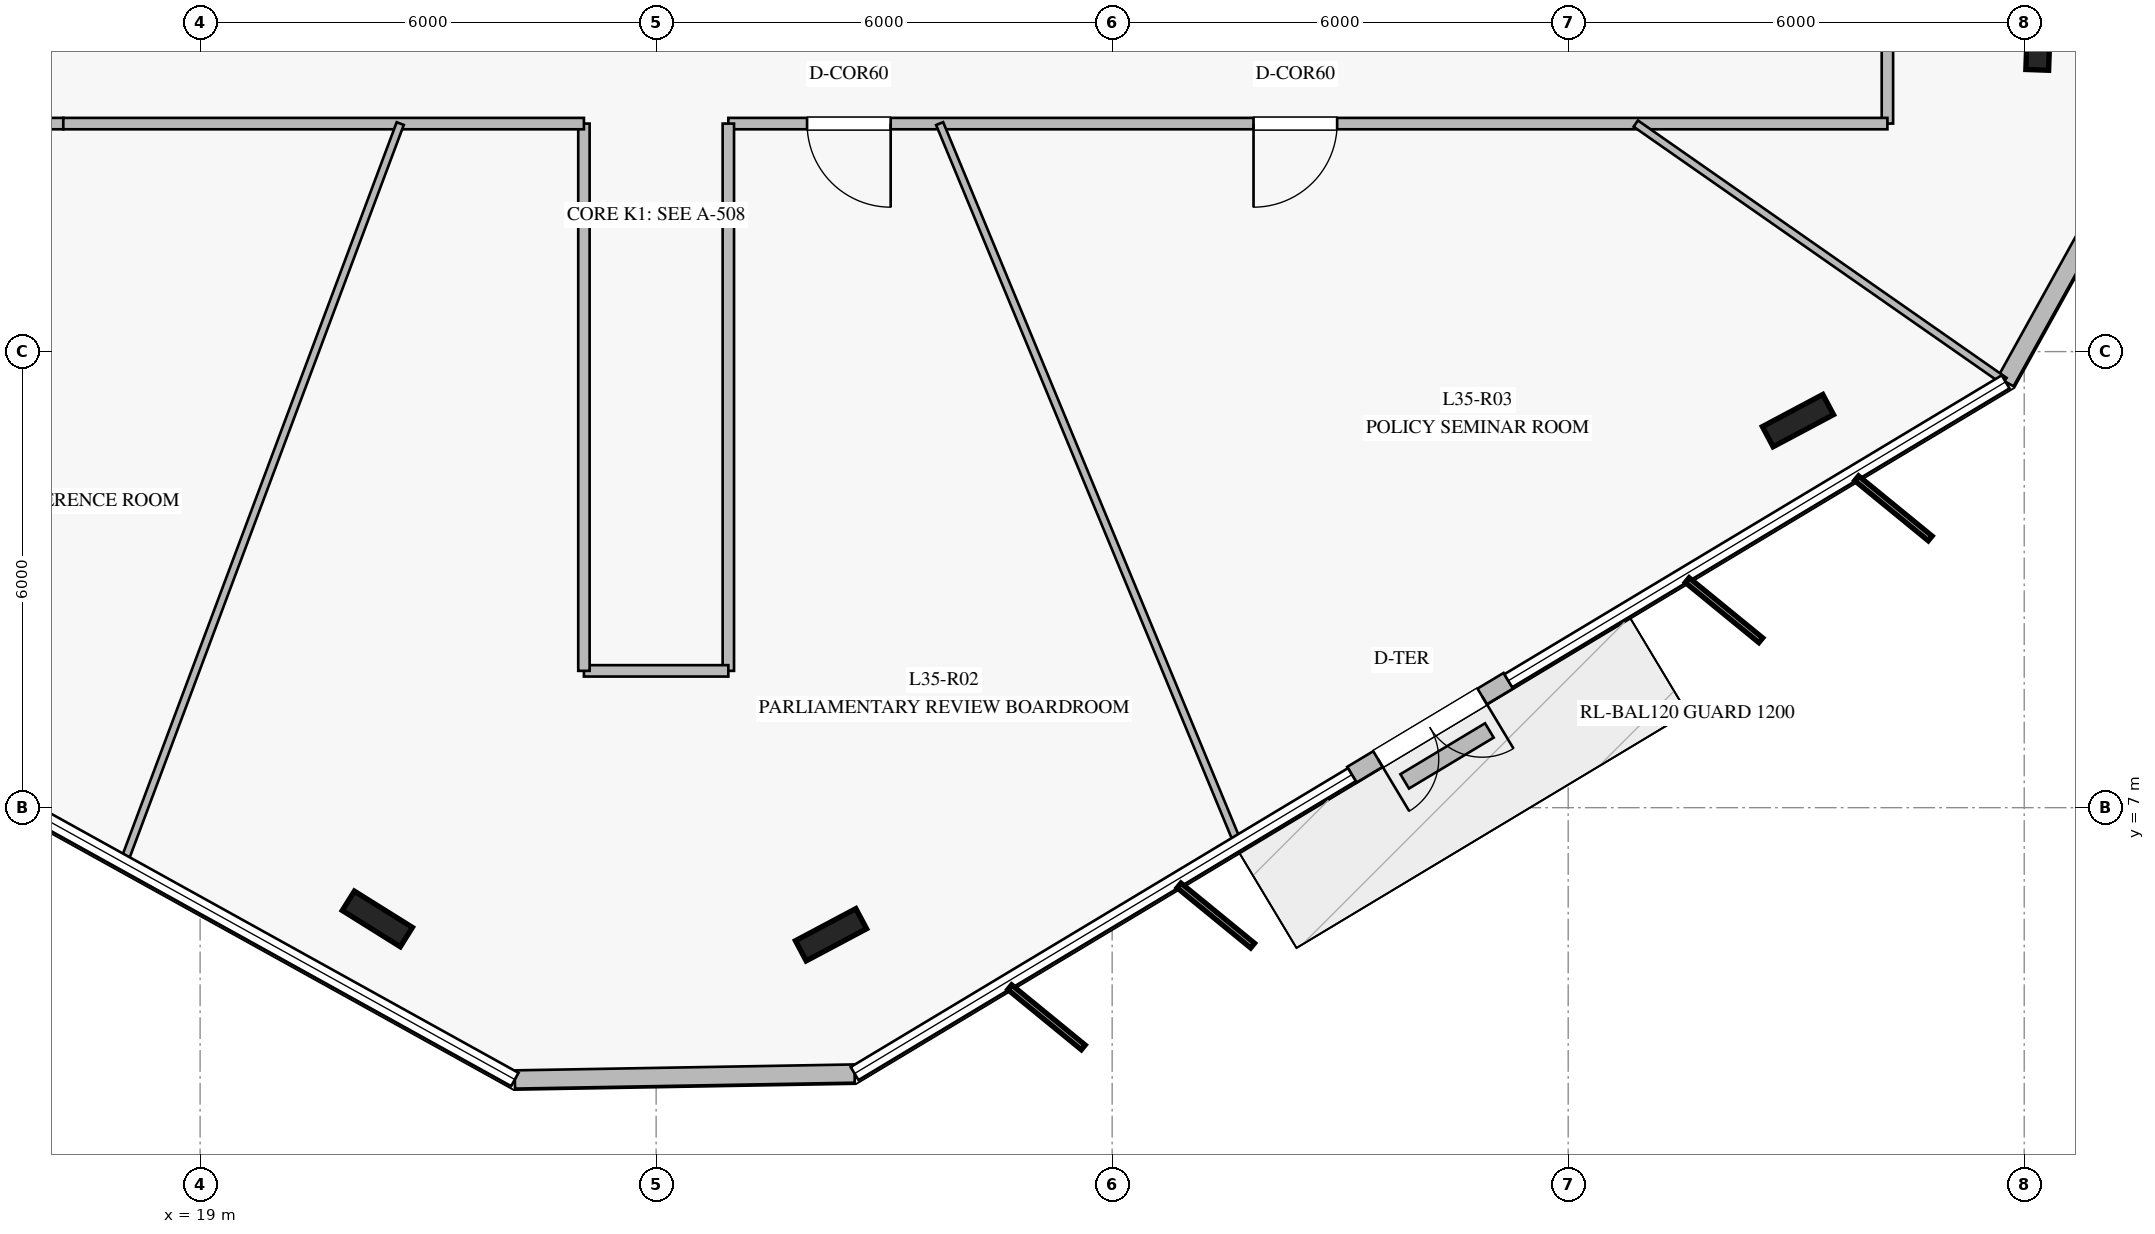
"""IFC4 building model, lengths in metres.
Left out: names, types, materials, properties, quantities, classifications, styles, units other than length and angle.
Written with IfcOpenShell. Run it as: python <this file> out.ifc"""

import sys

from ifc_helpers import new_model, si_unit, direction, frame, frame_2d, origin, origin_2d, place, context, subcontext, project, spatial, rectangle, i_section, extrude, element, fill, save


model = new_model("IFC4")
c1 = context("Model", 3, precision=1e-05, world=origin(), true_north=direction((0.0, 1.0)))
c2 = subcontext(c1, "Body", "Model", "MODEL_VIEW")
j1 = project(units=[si_unit("LENGTHUNIT", "METRE"), si_unit("PLANEANGLEUNIT", "RADIAN")], contexts=[c1])
p1 = place(None, origin())
s1 = spatial("IfcSite", under=j1, at=p1, CompositionType="ELEMENT")
p2 = place(p1, origin())
s2 = spatial("IfcBuilding", under=s1, at=p2, CompositionType="ELEMENT")
p3 = place(p2, frame((0.0, 0.0, 146.4)))
s3 = spatial("IfcBuildingStorey", under=s2, at=p3, CompositionType="ELEMENT", Elevation=146.4)
for number, where, z_axis, x_axis in (
    (1, (21.332, 5.536, 0.0), (0.0, 0.0, 1.0), (-0.848, 0.53, 0.0)),
    (2, (27.301, 5.328, 0.0), (0.0, 0.0, 1.0), (0.883, 0.469, 0.0)),
    (3, (40.023, 12.092, 0.0), (0.0, 0.0, 1.0), (0.883, 0.469, 0.0)),
):
    element("IfcColumn", number, at=place(p3, frame(where, z_axis=z_axis, x_axis=x_axis)), inside=s3, PredefinedType="COLUMN", context=c2, shape_type="SweptSolid", body=[
        extrude(i_section(OverallWidth=0.3, OverallDepth=0.9, WebThickness=0.019, FlangeThickness=0.035, at=origin_2d()), origin(), (0.0, 0.0, 1.0), 4.0),
    ])
p4 = place(p3, frame((23.141, 3.424, 0.0), z_axis=(0.0, 0.0, 1.0), x_axis=(0.999848251902, 0.017420481313, 0.0)))
e4 = element("IfcWall", 4, at=p4, inside=s3, PredefinedType="STANDARD", context=c2, shape_type="SweptSolid", body=[
    extrude(rectangle(XDim=4.471, YDim=0.24, at=frame_2d((2.235, 0.0))), origin(), (0.0, 0.0, 1.0), 3.76),
])
p5 = place(p3, frame((34.154, 7.434, 0.0), z_axis=(0.0, 0.0, 1.0), x_axis=(0.857286451771, 0.514839722253, 0.0)))
e5 = element("IfcWall", 5, at=p5, inside=s3, PredefinedType="STANDARD", context=c2, shape_type="SweptSolid", body=[
    extrude(rectangle(XDim=2.4, YDim=0.24, at=frame_2d((1.2, 0.0))), origin(), (0.0, 0.0, 1.0), 3.76),
])
p6 = place(p5, frame((0.4, 0.0, 0.0)))
e6 = element("IfcOpeningElement", 6, at=p6, cuts=e5, PredefinedType="OPENING", context=c2, shape_type="SweptSolid", body=[
    extrude(rectangle(XDim=1.6, YDim=2.25, at=frame_2d((0.8, 1.125))), frame((0.0, 0.13, 0.0), z_axis=(0.0, -1.0, 0.0), x_axis=(1.0, 0.0, 0.0)), (0.0, 0.0, 1.0), 0.26),
])
p7 = place(p3, frame((42.755, 12.602, 0.0), z_axis=(0.0, 0.0, 1.0), x_axis=(0.484965863304, 0.874533081953, 0.0)))
e7 = element("IfcWall", 7, at=p7, inside=s3, PredefinedType="STANDARD", context=c2, shape_type="SweptSolid", body=[
    extrude(rectangle(XDim=4.471, YDim=0.24, at=frame_2d((2.235, 0.0))), origin(), (0.0, 0.0, 1.0), 3.76),
])
p8 = place(p3, frame((34.849, 7.346, 0.0), z_axis=(0.0, 0.0, 1.0), x_axis=(0.856845918969, 0.515572566324, 0.0)))
e8 = element("IfcWall", 8, at=p8, inside=s3, PredefinedType="USERDEFINED", context=c2, shape_type="SweptSolid", body=[
    extrude(rectangle(XDim=1.3, YDim=0.22, at=frame_2d((0.65, 0.0))), origin(), (0.0, 0.0, 1.0), 0.4),
])
p9 = place(p3, frame((17.2, 16.0, 0.0), z_axis=(0.0, 0.0, 1.0), x_axis=(-1.0, 0.0, 0.0)))
e9 = element("IfcWall", 9, at=p9, inside=s3, PredefinedType="PARTITIONING", context=c2, shape_type="SweptSolid", body=[
    extrude(rectangle(XDim=1.8, YDim=0.15, at=frame_2d((0.9, 0.0))), origin(), (0.0, 0.0, 1.0), 3.36),
])
p10 = place(p9, frame((0.287, 0.0, 0.0)))
e10 = element("IfcOpeningElement", 10, at=p10, cuts=e9, PredefinedType="OPENING", context=c2, shape_type="SweptSolid", body=[
    extrude(rectangle(XDim=1.1, YDim=2.2, at=frame_2d((0.55, 1.1))), frame((0.0, 0.085, 0.0), z_axis=(0.0, -1.0, 0.0), x_axis=(1.0, 0.0, 0.0)), (0.0, 0.0, 1.0), 0.17),
])
p11 = place(p3, frame((41.2, 17.8, 0.0), z_axis=(0.0, 0.0, 1.0), x_axis=(0.0, -1.0, 0.0)))
e11 = element("IfcWall", 11, at=p11, inside=s3, PredefinedType="PARTITIONING", context=c2, shape_type="SweptSolid", body=[
    extrude(rectangle(XDim=1.8, YDim=0.15, at=frame_2d((0.9, 0.0))), origin(), (0.0, 0.0, 1.0), 3.21),
])
p12 = place(p3, frame((41.2, 16.0, 0.0), z_axis=(0.0, 0.0, 1.0), x_axis=(-1.0, 0.0, 0.0)))
e12 = element("IfcWall", 12, at=p12, inside=s3, PredefinedType="PARTITIONING", context=c2, shape_type="SweptSolid", body=[
    extrude(rectangle(XDim=15.25, YDim=0.15, at=frame_2d((7.625, 0.0))), origin(), (0.0, 0.0, 1.0), 3.21),
])
p13 = place(p12, frame((13.114, 0.0, 0.0)))
e13 = element("IfcOpeningElement", 13, at=p13, cuts=e12, PredefinedType="OPENING", context=c2, shape_type="SweptSolid", body=[
    extrude(rectangle(XDim=1.1, YDim=2.2, at=frame_2d((0.55, 1.1))), frame((0.0, 0.085, 0.0), z_axis=(0.0, -1.0, 0.0), x_axis=(1.0, 0.0, 0.0)), (0.0, 0.0, 1.0), 0.17),
])
p14 = place(p12, frame((7.24, 0.0, 0.0)))
e14 = element("IfcOpeningElement", 14, at=p14, cuts=e12, PredefinedType="OPENING", context=c2, shape_type="SweptSolid", body=[
    extrude(rectangle(XDim=1.1, YDim=2.2, at=frame_2d((0.55, 1.1))), frame((0.0, 0.085, 0.0), z_axis=(0.0, -1.0, 0.0), x_axis=(1.0, 0.0, 0.0)), (0.0, 0.0, 1.0), 0.17),
])
p15 = place(p3, frame((25.95, 16.0, 0.0), z_axis=(0.0, 0.0, 1.0), x_axis=(0.0, -1.0, 0.0)))
e15 = element("IfcWall", 15, at=p15, inside=s3, PredefinedType="PARTITIONING", context=c2, shape_type="SweptSolid", body=[
    extrude(rectangle(XDim=7.2, YDim=0.15, at=frame_2d((3.6, 0.0))), origin(), (0.0, 0.0, 1.0), 3.36),
])
p16 = place(p3, frame((25.95, 8.8, 0.0), z_axis=(0.0, 0.0, 1.0), x_axis=(-1.0, 0.0, 0.0)))
e16 = element("IfcWall", 16, at=p16, inside=s3, PredefinedType="PARTITIONING", context=c2, shape_type="SweptSolid", body=[
    extrude(rectangle(XDim=1.9, YDim=0.15, at=frame_2d((0.95, 0.0))), origin(), (0.0, 0.0, 1.0), 3.76),
])
p17 = place(p3, frame((24.05, 8.8, 0.0), z_axis=(0.0, 0.0, 1.0), x_axis=(0.0, 1.0, 0.0)))
e17 = element("IfcWall", 17, at=p17, inside=s3, PredefinedType="PARTITIONING", context=c2, shape_type="SweptSolid", body=[
    extrude(rectangle(XDim=7.2, YDim=0.15, at=frame_2d((3.6, 0.0))), origin(), (0.0, 0.0, 1.0), 3.36),
])
p18 = place(p3, frame((24.05, 16.0, 0.0), z_axis=(0.0, 0.0, 1.0), x_axis=(-1.0, 0.0, 0.0)))
e18 = element("IfcWall", 18, at=p18, inside=s3, PredefinedType="PARTITIONING", context=c2, shape_type="SweptSolid", body=[
    extrude(rectangle(XDim=6.85, YDim=0.15, at=frame_2d((3.425, 0.0))), origin(), (0.0, 0.0, 1.0), 3.21),
])
p19 = place(p3, frame((21.633, 16.0, 0.0), z_axis=(0.0, 0.0, 1.0), x_axis=(-0.350441839508, -0.936584495453, 0.0)))
e19 = element("IfcWall", 19, at=p19, inside=s3, PredefinedType="MOVABLE", context=c2, shape_type="SweptSolid", body=[
    extrude(rectangle(XDim=10.364, YDim=0.1, at=frame_2d((5.182, 0.0))), origin(), (0.0, 0.0, 1.0), 3.16),
])
p20 = place(p3, frame((28.73, 16.0, 0.0), z_axis=(0.0, 0.0, 1.0), x_axis=(0.382840702712, -0.923814373317, 0.0)))
e20 = element("IfcWall", 20, at=p20, inside=s3, PredefinedType="MOVABLE", context=c2, shape_type="SweptSolid", body=[
    extrude(rectangle(XDim=10.231, YDim=0.1, at=frame_2d((5.116, 0.0))), origin(), (0.0, 0.0, 1.0), 3.05),
])
p21 = place(p3, frame((37.889, 16.0, 0.0), z_axis=(0.0, 0.0, 1.0), x_axis=(0.819929213153, -0.572464920688, 0.0)))
e21 = element("IfcWall", 21, at=p21, inside=s3, PredefinedType="MOVABLE", context=c2, shape_type="SweptSolid", body=[
    extrude(rectangle(XDim=5.917, YDim=0.1, at=frame_2d((2.958, 0.0))), origin(), (0.0, 0.0, 1.0), 3.16),
])
p22 = place(p6, frame((1.6, 0.0, 0.0), z_axis=(0.0, 0.0, 1.0), x_axis=(-1.0, 0.0, 0.0)))
e22 = element("IfcDoor", 22, at=p22, inside=s3, OperationType="DOUBLE_DOOR_SINGLE_SWING", PredefinedType="DOOR", context=c2, shape_type="SweptSolid", body=[
    extrude(rectangle(XDim=1.6, YDim=2.25, at=frame_2d((0.8, 1.125))), frame((0.0, 0.025, 0.0), z_axis=(0.0, -1.0, 0.0), x_axis=(1.0, 0.0, 0.0)), (0.0, 0.0, 1.0), 0.05),
])
fill(e6, e22)
p23 = place(p13, origin())
e23 = element("IfcDoor", 23, at=p23, inside=s3, OperationType="SINGLE_SWING_LEFT", PredefinedType="DOOR", context=c2, shape_type="SweptSolid", body=[
    extrude(rectangle(XDim=1.1, YDim=2.2, at=frame_2d((0.55, 1.1))), frame((0.0, 0.025, 0.0), z_axis=(0.0, -1.0, 0.0), x_axis=(1.0, 0.0, 0.0)), (0.0, 0.0, 1.0), 0.05),
])
fill(e13, e23)
p24 = place(p14, origin())
e24 = element("IfcDoor", 24, at=p24, inside=s3, OperationType="SINGLE_SWING_RIGHT", PredefinedType="DOOR", context=c2, shape_type="SweptSolid", body=[
    extrude(rectangle(XDim=1.1, YDim=2.2, at=frame_2d((0.55, 1.1))), frame((0.0, 0.025, 0.0), z_axis=(0.0, -1.0, 0.0), x_axis=(1.0, 0.0, 0.0)), (0.0, 0.0, 1.0), 0.05),
])
fill(e14, e24)
save(model, sys.argv[1])
